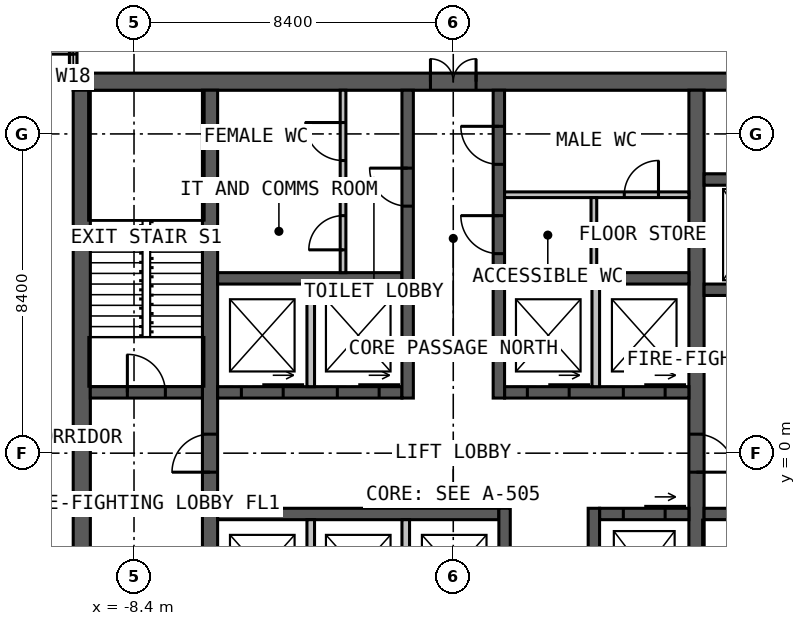
"""IFC4 building model, lengths in metres.
Left out: names, types, materials, properties, quantities, classifications, styles, units other than length and angle.
Written with IfcOpenShell. Run it as: python <this file> out.ifc"""

import sys

from ifc_helpers import new_model, si_unit, direction, frame, frame_2d, origin, place, context, subcontext, project, spatial, rectangle, extrude, element, fill, save


model = new_model("IFC4")
c1 = context("Model", 3, precision=1e-05, world=origin(), true_north=direction((0.0, 1.0)))
c2 = subcontext(c1, "Body", "Model", "MODEL_VIEW")
j1 = project(units=[si_unit("LENGTHUNIT", "METRE"), si_unit("PLANEANGLEUNIT", "RADIAN")], contexts=[c1])
p1 = place(None, origin())
s1 = spatial("IfcSite", under=j1, at=p1, CompositionType="ELEMENT")
p2 = place(p1, origin())
s2 = spatial("IfcBuilding", under=s1, at=p2, CompositionType="ELEMENT")
p3 = place(p2, frame((0.0, 0.0, 167.0)))
s3 = spatial("IfcBuildingStorey", under=s2, at=p3, CompositionType="ELEMENT", Elevation=167.0)
p4 = place(p3, frame((-10.0, 9.775, 0.0), z_axis=(0.0, 0.0, 1.0), x_axis=(1.0, 0.0, 0.0)))
e1 = element("IfcWall", 1, at=p4, inside=s3, PredefinedType="SOLIDWALL", context=c2, shape_type="SweptSolid", body=[
    extrude(rectangle(XDim=20.0, YDim=0.45, at=frame_2d((10.0, 0.0))), origin(), (0.0, 0.0, 1.0), 4.0),
])
p5 = place(p4, frame((9.4, 0.0, 0.0)))
e2 = element("IfcOpeningElement", 2, at=p5, cuts=e1, PredefinedType="OPENING", context=c2, shape_type="SweptSolid", body=[
    extrude(rectangle(XDim=1.2, YDim=2.2, at=frame_2d((0.6, 1.1))), frame((0.0, 0.235, 0.0), z_axis=(0.0, -1.0, 0.0), x_axis=(1.0, 0.0, 0.0)), (0.0, 0.0, 1.0), 0.47),
])
p6 = place(p3, frame((-9.775, 9.55, 0.0), z_axis=(0.0, 0.0, 1.0), x_axis=(0.0, -1.0, 0.0)))
e3 = element("IfcWall", 3, at=p6, inside=s3, PredefinedType="SOLIDWALL", context=c2, shape_type="SweptSolid", body=[
    extrude(rectangle(XDim=19.1, YDim=0.45, at=frame_2d((9.55, 0.0))), origin(), (0.0, 0.0, 1.0), 4.0),
])
p7 = place(p3, frame((-6.4, -9.55, 0.0), z_axis=(0.0, 0.0, 1.0), x_axis=(0.0, 1.0, 0.0)))
e4 = element("IfcWall", 4, at=p7, inside=s3, PredefinedType="SOLIDWALL", context=c2, shape_type="SweptSolid", body=[
    extrude(rectangle(XDim=19.1, YDim=0.4, at=frame_2d((9.55, 0.0))), origin(), (0.0, 0.0, 1.0), 4.0),
])
p8 = place(p7, frame((9.05, 0.0, 0.0)))
e5 = element("IfcOpeningElement", 5, at=p8, cuts=e4, PredefinedType="OPENING", context=c2, shape_type="SweptSolid", body=[
    extrude(rectangle(XDim=1.0, YDim=2.2, at=frame_2d((0.5, 1.1))), frame((0.0, 0.21, 0.0), z_axis=(0.0, -1.0, 0.0), x_axis=(1.0, 0.0, 0.0)), (0.0, 0.0, 1.0), 0.42),
])
p9 = place(p3, frame((6.4, 9.55, 0.0), z_axis=(0.0, 0.0, 1.0), x_axis=(0.0, -1.0, 0.0)))
e6 = element("IfcWall", 6, at=p9, inside=s3, PredefinedType="SOLIDWALL", context=c2, shape_type="SweptSolid", body=[
    extrude(rectangle(XDim=19.1, YDim=0.4, at=frame_2d((9.55, 0.0))), origin(), (0.0, 0.0, 1.0), 4.0),
])
p10 = place(p9, frame((9.05, 0.0, 0.0)))
e7 = element("IfcOpeningElement", 7, at=p10, cuts=e6, PredefinedType="OPENING", context=c2, shape_type="SweptSolid", body=[
    extrude(rectangle(XDim=1.0, YDim=2.2, at=frame_2d((0.5, 1.1))), frame((0.0, 0.21, 0.0), z_axis=(0.0, -1.0, 0.0), x_axis=(1.0, 0.0, 0.0)), (0.0, 0.0, 1.0), 0.42),
])
p11 = place(p3, frame((-6.2, 1.6, 0.0), z_axis=(0.0, 0.0, 1.0), x_axis=(1.0, 0.0, 0.0)))
e8 = element("IfcWall", 8, at=p11, inside=s3, PredefinedType="SOLIDWALL", context=c2, shape_type="SweptSolid", body=[
    extrude(rectangle(XDim=4.85, YDim=0.3, at=frame_2d((2.425, 0.0))), origin(), (0.0, 0.0, 1.0), 4.0),
])
p12 = place(p11, frame((0.625, 0.0, 0.0)))
e9 = element("IfcOpeningElement", 9, at=p12, cuts=e8, PredefinedType="OPENING", context=c2, shape_type="SweptSolid", body=[
    extrude(rectangle(XDim=1.1, YDim=2.2, at=frame_2d((0.55, 1.1))), frame((0.0, 0.16, 0.0), z_axis=(0.0, -1.0, 0.0), x_axis=(1.0, 0.0, 0.0)), (0.0, 0.0, 1.0), 0.32),
])
p13 = place(p11, frame((3.15, 0.0, 0.0)))
e10 = element("IfcOpeningElement", 10, at=p13, cuts=e8, PredefinedType="OPENING", context=c2, shape_type="SweptSolid", body=[
    extrude(rectangle(XDim=1.1, YDim=2.2, at=frame_2d((0.55, 1.1))), frame((0.0, 0.16, 0.0), z_axis=(0.0, -1.0, 0.0), x_axis=(1.0, 0.0, 0.0)), (0.0, 0.0, 1.0), 0.32),
])
p14 = place(p3, frame((1.35, 1.6, 0.0), z_axis=(0.0, 0.0, 1.0), x_axis=(1.0, 0.0, 0.0)))
e11 = element("IfcWall", 11, at=p14, inside=s3, PredefinedType="SOLIDWALL", context=c2, shape_type="SweptSolid", body=[
    extrude(rectangle(XDim=4.85, YDim=0.3, at=frame_2d((2.425, 0.0))), origin(), (0.0, 0.0, 1.0), 4.0),
])
p15 = place(p14, frame((0.6, 0.0, 0.0)))
e12 = element("IfcOpeningElement", 12, at=p15, cuts=e11, PredefinedType="OPENING", context=c2, shape_type="SweptSolid", body=[
    extrude(rectangle(XDim=1.1, YDim=2.2, at=frame_2d((0.55, 1.1))), frame((0.0, 0.16, 0.0), z_axis=(0.0, -1.0, 0.0), x_axis=(1.0, 0.0, 0.0)), (0.0, 0.0, 1.0), 0.32),
])
p16 = place(p14, frame((3.125, 0.0, 0.0)))
e13 = element("IfcOpeningElement", 13, at=p16, cuts=e11, PredefinedType="OPENING", context=c2, shape_type="SweptSolid", body=[
    extrude(rectangle(XDim=1.1, YDim=2.2, at=frame_2d((0.55, 1.1))), frame((0.0, 0.16, 0.0), z_axis=(0.0, -1.0, 0.0), x_axis=(1.0, 0.0, 0.0)), (0.0, 0.0, 1.0), 0.32),
])
for number, where, z_axis, x_axis in (
    (14, (-6.2, 4.6, 0.0), (0.0, 0.0, 1.0), (1.0, 0.0, 0.0)),
    (15, (1.35, 4.6, 0.0), (0.0, 0.0, 1.0), (1.0, 0.0, 0.0)),
):
    element("IfcWall", number, at=place(p3, frame(where, z_axis=z_axis, x_axis=x_axis)), inside=s3, PredefinedType="SOLIDWALL", context=c2, shape_type="SweptSolid", body=[
        extrude(rectangle(XDim=4.85, YDim=0.3, at=frame_2d((2.425, 0.0))), origin(), (0.0, 0.0, 1.0), 4.0),
    ])
p17 = place(p3, frame((-1.2, 1.45, 0.0), z_axis=(0.0, 0.0, 1.0), x_axis=(0.0, 1.0, 0.0)))
e16 = element("IfcWall", 16, at=p17, inside=s3, PredefinedType="SOLIDWALL", context=c2, shape_type="SweptSolid", body=[
    extrude(rectangle(XDim=8.1, YDim=0.3, at=frame_2d((4.05, 0.0))), origin(), (0.0, 0.0, 1.0), 4.0),
])
p18 = place(p17, frame((5.05, 0.0, 0.0)))
e17 = element("IfcOpeningElement", 17, at=p18, cuts=e16, PredefinedType="OPENING", context=c2, shape_type="SweptSolid", body=[
    extrude(rectangle(XDim=1.0, YDim=2.2, at=frame_2d((0.5, 1.1))), frame((0.0, 0.16, 0.0), z_axis=(0.0, -1.0, 0.0), x_axis=(1.0, 0.0, 0.0)), (0.0, 0.0, 1.0), 0.32),
])
p19 = place(p3, frame((1.2, 1.45, 0.0), z_axis=(0.0, 0.0, 1.0), x_axis=(0.0, 1.0, 0.0)))
e18 = element("IfcWall", 18, at=p19, inside=s3, PredefinedType="SOLIDWALL", context=c2, shape_type="SweptSolid", body=[
    extrude(rectangle(XDim=8.1, YDim=0.3, at=frame_2d((4.05, 0.0))), origin(), (0.0, 0.0, 1.0), 4.0),
])
p20 = place(p19, frame((3.8, 0.0, 0.0)))
e19 = element("IfcOpeningElement", 19, at=p20, cuts=e18, PredefinedType="OPENING", context=c2, shape_type="SweptSolid", body=[
    extrude(rectangle(XDim=1.0, YDim=2.2, at=frame_2d((0.5, 1.1))), frame((0.0, 0.16, 0.0), z_axis=(0.0, -1.0, 0.0), x_axis=(1.0, 0.0, 0.0)), (0.0, 0.0, 1.0), 0.32),
])
p21 = place(p19, frame((6.15, 0.0, 0.0)))
e20 = element("IfcOpeningElement", 20, at=p21, cuts=e18, PredefinedType="OPENING", context=c2, shape_type="SweptSolid", body=[
    extrude(rectangle(XDim=1.0, YDim=2.2, at=frame_2d((0.5, 1.1))), frame((0.0, 0.16, 0.0), z_axis=(0.0, -1.0, 0.0), x_axis=(1.0, 0.0, 0.0)), (0.0, 0.0, 1.0), 0.32),
])
p22 = place(p3, frame((-6.2, -1.6, 0.0), z_axis=(0.0, 0.0, 1.0), x_axis=(1.0, 0.0, 0.0)))
e21 = element("IfcWall", 21, at=p22, inside=s3, PredefinedType="SOLIDWALL", context=c2, shape_type="SweptSolid", body=[
    extrude(rectangle(XDim=7.4, YDim=0.3, at=frame_2d((3.7, 0.0))), origin(), (0.0, 0.0, 1.0), 4.0),
])
p23 = place(p3, frame((3.85, -1.6, 0.0), z_axis=(0.0, 0.0, 1.0), x_axis=(1.0, 0.0, 0.0)))
e22 = element("IfcWall", 22, at=p23, inside=s3, PredefinedType="SOLIDWALL", context=c2, shape_type="SweptSolid", body=[
    extrude(rectangle(XDim=2.35, YDim=0.3, at=frame_2d((1.175, 0.0))), origin(), (0.0, 0.0, 1.0), 4.0),
])
p24 = place(p23, frame((0.625, 0.0, 0.0)))
e23 = element("IfcOpeningElement", 23, at=p24, cuts=e22, PredefinedType="OPENING", context=c2, shape_type="SweptSolid", body=[
    extrude(rectangle(XDim=1.1, YDim=2.2, at=frame_2d((0.55, 1.1))), frame((0.0, 0.16, 0.0), z_axis=(0.0, -1.0, 0.0), x_axis=(1.0, 0.0, 0.0)), (0.0, 0.0, 1.0), 0.32),
])
p25 = place(p3, frame((1.35, -1.45, 0.0), z_axis=(0.0, 0.0, 1.0), x_axis=(0.0, -1.0, 0.0)))
e24 = element("IfcWall", 24, at=p25, inside=s3, PredefinedType="SOLIDWALL", context=c2, shape_type="SweptSolid", body=[
    extrude(rectangle(XDim=8.1, YDim=0.3, at=frame_2d((4.05, 0.0))), origin(), (0.0, 0.0, 1.0), 4.0),
])
p26 = place(p25, frame((5.975, 0.0, 0.0)))
e25 = element("IfcOpeningElement", 25, at=p26, cuts=e24, PredefinedType="OPENING", context=c2, shape_type="SweptSolid", body=[
    extrude(rectangle(XDim=1.0, YDim=2.2, at=frame_2d((0.5, 1.1))), frame((0.0, 0.16, 0.0), z_axis=(0.0, -1.0, 0.0), x_axis=(1.0, 0.0, 0.0)), (0.0, 0.0, 1.0), 0.32),
])
p27 = place(p25, frame((3.525, 0.0, 0.0)))
e26 = element("IfcOpeningElement", 26, at=p27, cuts=e24, PredefinedType="OPENING", context=c2, shape_type="SweptSolid", body=[
    extrude(rectangle(XDim=0.9, YDim=2.2, at=frame_2d((0.45, 1.1))), frame((0.0, 0.16, 0.0), z_axis=(0.0, -1.0, 0.0), x_axis=(1.0, 0.0, 0.0)), (0.0, 0.0, 1.0), 0.32),
])
p28 = place(p3, frame((3.7, -1.45, 0.0), z_axis=(0.0, 0.0, 1.0), x_axis=(0.0, -1.0, 0.0)))
e27 = element("IfcWall", 27, at=p28, inside=s3, PredefinedType="SOLIDWALL", context=c2, shape_type="SweptSolid", body=[
    extrude(rectangle(XDim=8.1, YDim=0.3, at=frame_2d((4.05, 0.0))), origin(), (0.0, 0.0, 1.0), 4.0),
])
p29 = place(p28, frame((5.1, 0.0, 0.0)))
e28 = element("IfcOpeningElement", 28, at=p29, cuts=e27, PredefinedType="OPENING", context=c2, shape_type="SweptSolid", body=[
    extrude(rectangle(XDim=0.9, YDim=2.2, at=frame_2d((0.45, 1.1))), frame((0.0, 0.16, 0.0), z_axis=(0.0, -1.0, 0.0), x_axis=(1.0, 0.0, 0.0)), (0.0, 0.0, 1.0), 0.32),
])
p30 = place(p3, frame((-9.55, 1.6, 0.0), z_axis=(0.0, 0.0, 1.0), x_axis=(1.0, 0.0, 0.0)))
e29 = element("IfcWall", 29, at=p30, inside=s3, PredefinedType="SOLIDWALL", context=c2, shape_type="SweptSolid", body=[
    extrude(rectangle(XDim=2.95, YDim=0.3, at=frame_2d((1.475, 0.0))), origin(), (0.0, 0.0, 1.0), 4.0),
])
p31 = place(p30, frame((0.975, 0.0, 0.0)))
e30 = element("IfcOpeningElement", 30, at=p31, cuts=e29, PredefinedType="OPENING", context=c2, shape_type="SweptSolid", body=[
    extrude(rectangle(XDim=1.0, YDim=2.2, at=frame_2d((0.5, 1.1))), frame((0.0, 0.16, 0.0), z_axis=(0.0, -1.0, 0.0), x_axis=(1.0, 0.0, 0.0)), (0.0, 0.0, 1.0), 0.32),
])
p32 = place(p3, frame((6.6, -1.6, 0.0), z_axis=(0.0, 0.0, 1.0), x_axis=(1.0, 0.0, 0.0)))
e31 = element("IfcWall", 31, at=p32, inside=s3, PredefinedType="SOLIDWALL", context=c2, shape_type="SweptSolid", body=[
    extrude(rectangle(XDim=2.95, YDim=0.3, at=frame_2d((1.475, 0.0))), origin(), (0.0, 0.0, 1.0), 4.0),
])
p33 = place(p32, frame((0.975, 0.0, 0.0)))
e32 = element("IfcOpeningElement", 32, at=p33, cuts=e31, PredefinedType="OPENING", context=c2, shape_type="SweptSolid", body=[
    extrude(rectangle(XDim=1.0, YDim=2.2, at=frame_2d((0.5, 1.1))), frame((0.0, 0.16, 0.0), z_axis=(0.0, -1.0, 0.0), x_axis=(1.0, 0.0, 0.0)), (0.0, 0.0, 1.0), 0.32),
])
p34 = place(p3, frame((6.6, 4.3, 0.0), z_axis=(0.0, 0.0, 1.0), x_axis=(1.0, 0.0, 0.0)))
e33 = element("IfcWall", 33, at=p34, inside=s3, PredefinedType="SOLIDWALL", context=c2, shape_type="SweptSolid", body=[
    extrude(rectangle(XDim=2.95, YDim=0.3, at=frame_2d((1.475, 0.0))), origin(), (0.0, 0.0, 1.0), 4.0),
])
p35 = place(p34, frame((0.75, 0.0, 0.0)))
e34 = element("IfcOpeningElement", 34, at=p35, cuts=e33, PredefinedType="OPENING", context=c2, shape_type="SweptSolid", body=[
    extrude(rectangle(XDim=1.1, YDim=2.2, at=frame_2d((0.55, 1.1))), frame((0.0, 0.16, 0.0), z_axis=(0.0, -1.0, 0.0), x_axis=(1.0, 0.0, 0.0)), (0.0, 0.0, 1.0), 0.32),
])
p36 = place(p3, frame((6.6, 7.2, 0.0), z_axis=(0.0, 0.0, 1.0), x_axis=(1.0, 0.0, 0.0)))
e35 = element("IfcWall", 35, at=p36, inside=s3, PredefinedType="SOLIDWALL", context=c2, shape_type="SweptSolid", body=[
    extrude(rectangle(XDim=2.95, YDim=0.3, at=frame_2d((1.475, 0.0))), origin(), (0.0, 0.0, 1.0), 4.0),
])
for number, where, z_axis, x_axis in (
    (36, (-3.75, 1.75, 0.0), (0.0, 0.0, 1.0), (0.0, 1.0, 0.0)),
    (37, (3.75, 1.75, 0.0), (0.0, 0.0, 1.0), (0.0, 1.0, 0.0)),
    (38, (-3.75, -1.75, 0.0), (0.0, 0.0, 1.0), (0.0, -1.0, 0.0)),
    (39, (-1.25, -1.75, 0.0), (0.0, 0.0, 1.0), (0.0, -1.0, 0.0)),
):
    element("IfcWall", number, at=place(p3, frame(where, z_axis=z_axis, x_axis=x_axis)), inside=s3, PredefinedType="SOLIDWALL", context=c2, shape_type="SweptSolid", body=[
        extrude(rectangle(XDim=2.7, YDim=0.2, at=frame_2d((1.35, 0.0))), origin(), (0.0, 0.0, 1.0), 3.75),
    ])
p37 = place(p3, frame((1.35, 6.8, 0.0), z_axis=(0.0, 0.0, 1.0), x_axis=(1.0, 0.0, 0.0)))
e40 = element("IfcWall", 40, at=p37, inside=s3, PredefinedType="PARTITIONING", context=c2, shape_type="SweptSolid", body=[
    extrude(rectangle(XDim=4.85, YDim=0.15, at=frame_2d((2.425, 0.0))), origin(), (0.0, 0.0, 1.0), 3.75),
])
p38 = place(p37, frame((3.15, 0.0, 0.0)))
e41 = element("IfcOpeningElement", 41, at=p38, cuts=e40, PredefinedType="OPENING", context=c2, shape_type="SweptSolid", body=[
    extrude(rectangle(XDim=0.9, YDim=2.2, at=frame_2d((0.45, 1.1))), frame((0.0, 0.085, 0.0), z_axis=(0.0, -1.0, 0.0), x_axis=(1.0, 0.0, 0.0)), (0.0, 0.0, 1.0), 0.17),
])
p39 = place(p3, frame((3.7, 4.75, 0.0), z_axis=(0.0, 0.0, 1.0), x_axis=(0.0, 1.0, 0.0)))
e42 = element("IfcWall", 42, at=p39, inside=s3, PredefinedType="PARTITIONING", context=c2, shape_type="SweptSolid", body=[
    extrude(rectangle(XDim=1.975, YDim=0.15, at=frame_2d((0.988, 0.0))), origin(), (0.0, 0.0, 1.0), 3.75),
])
p40 = place(p3, frame((-2.9, 4.75, 0.0), z_axis=(0.0, 0.0, 1.0), x_axis=(0.0, 1.0, 0.0)))
e43 = element("IfcWall", 43, at=p40, inside=s3, PredefinedType="PARTITIONING", context=c2, shape_type="SweptSolid", body=[
    extrude(rectangle(XDim=4.8, YDim=0.15, at=frame_2d((2.4, 0.0))), origin(), (0.0, 0.0, 1.0), 3.75),
])
p41 = place(p40, frame((2.95, 0.0, 0.0)))
e44 = element("IfcOpeningElement", 44, at=p41, cuts=e43, PredefinedType="OPENING", context=c2, shape_type="SweptSolid", body=[
    extrude(rectangle(XDim=1.0, YDim=2.2, at=frame_2d((0.5, 1.1))), frame((0.0, 0.085, 0.0), z_axis=(0.0, -1.0, 0.0), x_axis=(1.0, 0.0, 0.0)), (0.0, 0.0, 1.0), 0.17),
])
p42 = place(p40, frame((0.6, 0.0, 0.0)))
e45 = element("IfcOpeningElement", 45, at=p42, cuts=e43, PredefinedType="OPENING", context=c2, shape_type="SweptSolid", body=[
    extrude(rectangle(XDim=0.9, YDim=2.2, at=frame_2d((0.45, 1.1))), frame((0.0, 0.085, 0.0), z_axis=(0.0, -1.0, 0.0), x_axis=(1.0, 0.0, 0.0)), (0.0, 0.0, 1.0), 0.17),
])
p43 = place(p3, frame((-6.2, 7.0, 0.0), z_axis=(0.0, 0.0, 1.0), x_axis=(1.0, 0.0, 0.0)))
e46 = element("IfcWall", 46, at=p43, inside=s3, PredefinedType="PARTITIONING", context=c2, shape_type="SweptSolid", body=[
    extrude(rectangle(XDim=3.225, YDim=0.15, at=frame_2d((1.612, 0.0))), origin(), (0.0, 0.0, 1.0), 3.75),
])
p44 = place(p3, frame((-10.0, 10.0, 0.0), z_axis=(0.0, 0.0, 1.0), x_axis=(0.0, 1.0, 0.0)))
e47 = element("IfcWall", 47, at=p44, inside=s3, PredefinedType="PARTITIONING", context=c2, shape_type="SweptSolid", body=[
    extrude(rectangle(XDim=2.0, YDim=0.2, at=frame_2d((1.0, 0.0))), origin(), (0.0, 0.0, 1.0), 3.8),
])
p45 = place(p44, frame((0.5, 0.0, 0.0)))
e48 = element("IfcOpeningElement", 48, at=p45, cuts=e47, PredefinedType="OPENING", context=c2, shape_type="SweptSolid", body=[
    extrude(rectangle(XDim=1.0, YDim=2.2, at=frame_2d((0.5, 1.1))), frame((0.0, 0.11, 0.0), z_axis=(0.0, -1.0, 0.0), x_axis=(1.0, 0.0, 0.0)), (0.0, 0.0, 1.0), 0.22),
])
p46 = place(p5, origin())
e49 = element("IfcDoor", 49, at=p46, inside=s3, OperationType="DOUBLE_DOOR_SINGLE_SWING", PredefinedType="DOOR", context=c2, shape_type="SweptSolid", body=[
    extrude(rectangle(XDim=1.2, YDim=2.2, at=frame_2d((0.6, 1.1))), frame((0.0, 0.025, 0.0), z_axis=(0.0, -1.0, 0.0), x_axis=(1.0, 0.0, 0.0)), (0.0, 0.0, 1.0), 0.05),
])
fill(e2, e49)
p47 = place(p8, origin())
e50 = element("IfcDoor", 50, at=p47, inside=s3, OperationType="SINGLE_SWING_LEFT", PredefinedType="DOOR", context=c2, shape_type="SweptSolid", body=[
    extrude(rectangle(XDim=1.0, YDim=2.2, at=frame_2d((0.5, 1.1))), frame((0.0, 0.025, 0.0), z_axis=(0.0, -1.0, 0.0), x_axis=(1.0, 0.0, 0.0)), (0.0, 0.0, 1.0), 0.05),
])
fill(e5, e50)
p48 = place(p10, origin())
e51 = element("IfcDoor", 51, at=p48, inside=s3, OperationType="SINGLE_SWING_RIGHT", PredefinedType="DOOR", context=c2, shape_type="SweptSolid", body=[
    extrude(rectangle(XDim=1.0, YDim=2.2, at=frame_2d((0.5, 1.1))), frame((0.0, 0.025, 0.0), z_axis=(0.0, -1.0, 0.0), x_axis=(1.0, 0.0, 0.0)), (0.0, 0.0, 1.0), 0.05),
])
fill(e7, e51)
p49 = place(p31, origin())
e52 = element("IfcDoor", 52, at=p49, inside=s3, OperationType="SINGLE_SWING_LEFT", PredefinedType="DOOR", context=c2, shape_type="SweptSolid", body=[
    extrude(rectangle(XDim=1.0, YDim=2.2, at=frame_2d((0.5, 1.1))), frame((0.0, 0.025, 0.0), z_axis=(0.0, -1.0, 0.0), x_axis=(1.0, 0.0, 0.0)), (0.0, 0.0, 1.0), 0.05),
])
fill(e30, e52)
p50 = place(p18, origin())
e53 = element("IfcDoor", 53, at=p50, inside=s3, OperationType="SINGLE_SWING_RIGHT", PredefinedType="DOOR", context=c2, shape_type="SweptSolid", body=[
    extrude(rectangle(XDim=1.0, YDim=2.2, at=frame_2d((0.5, 1.1))), frame((0.0, 0.025, 0.0), z_axis=(0.0, -1.0, 0.0), x_axis=(1.0, 0.0, 0.0)), (0.0, 0.0, 1.0), 0.05),
])
fill(e17, e53)
p51 = place(p20, origin())
e54 = element("IfcDoor", 54, at=p51, inside=s3, OperationType="SINGLE_SWING_RIGHT", PredefinedType="DOOR", context=c2, shape_type="SweptSolid", body=[
    extrude(rectangle(XDim=1.0, YDim=2.2, at=frame_2d((0.5, 1.1))), frame((0.0, 0.025, 0.0), z_axis=(0.0, -1.0, 0.0), x_axis=(1.0, 0.0, 0.0)), (0.0, 0.0, 1.0), 0.05),
])
fill(e19, e54)
p52 = place(p21, origin())
e55 = element("IfcDoor", 55, at=p52, inside=s3, OperationType="SINGLE_SWING_RIGHT", PredefinedType="DOOR", context=c2, shape_type="SweptSolid", body=[
    extrude(rectangle(XDim=1.0, YDim=2.2, at=frame_2d((0.5, 1.1))), frame((0.0, 0.025, 0.0), z_axis=(0.0, -1.0, 0.0), x_axis=(1.0, 0.0, 0.0)), (0.0, 0.0, 1.0), 0.05),
])
fill(e20, e55)
p53 = place(p38, origin())
e56 = element("IfcDoor", 56, at=p53, inside=s3, OperationType="SINGLE_SWING_RIGHT", PredefinedType="DOOR", context=c2, shape_type="SweptSolid", body=[
    extrude(rectangle(XDim=0.9, YDim=2.2, at=frame_2d((0.45, 1.1))), frame((0.0, 0.025, 0.0), z_axis=(0.0, -1.0, 0.0), x_axis=(1.0, 0.0, 0.0)), (0.0, 0.0, 1.0), 0.05),
])
fill(e41, e56)
p54 = place(p41, origin())
e57 = element("IfcDoor", 57, at=p54, inside=s3, OperationType="SINGLE_SWING_RIGHT", PredefinedType="DOOR", context=c2, shape_type="SweptSolid", body=[
    extrude(rectangle(XDim=1.0, YDim=2.2, at=frame_2d((0.5, 1.1))), frame((0.0, 0.025, 0.0), z_axis=(0.0, -1.0, 0.0), x_axis=(1.0, 0.0, 0.0)), (0.0, 0.0, 1.0), 0.05),
])
fill(e44, e57)
p55 = place(p42, origin())
e58 = element("IfcDoor", 58, at=p55, inside=s3, OperationType="SINGLE_SWING_LEFT", PredefinedType="DOOR", context=c2, shape_type="SweptSolid", body=[
    extrude(rectangle(XDim=0.9, YDim=2.2, at=frame_2d((0.45, 1.1))), frame((0.0, 0.025, 0.0), z_axis=(0.0, -1.0, 0.0), x_axis=(1.0, 0.0, 0.0)), (0.0, 0.0, 1.0), 0.05),
])
fill(e45, e58)
p56 = place(p12, origin())
e59 = element("IfcDoor", 59, at=p56, inside=s3, OperationType="SLIDING_TO_LEFT", PredefinedType="DOOR", context=c2, shape_type="SweptSolid", body=[
    extrude(rectangle(XDim=1.1, YDim=2.2, at=frame_2d((0.55, 1.1))), frame((0.0, 0.025, 0.0), z_axis=(0.0, -1.0, 0.0), x_axis=(1.0, 0.0, 0.0)), (0.0, 0.0, 1.0), 0.05),
])
fill(e9, e59)
p57 = place(p13, origin())
e60 = element("IfcDoor", 60, at=p57, inside=s3, OperationType="SLIDING_TO_LEFT", PredefinedType="DOOR", context=c2, shape_type="SweptSolid", body=[
    extrude(rectangle(XDim=1.1, YDim=2.2, at=frame_2d((0.55, 1.1))), frame((0.0, 0.025, 0.0), z_axis=(0.0, -1.0, 0.0), x_axis=(1.0, 0.0, 0.0)), (0.0, 0.0, 1.0), 0.05),
])
fill(e10, e60)
p58 = place(p15, origin())
e61 = element("IfcDoor", 61, at=p58, inside=s3, OperationType="SLIDING_TO_LEFT", PredefinedType="DOOR", context=c2, shape_type="SweptSolid", body=[
    extrude(rectangle(XDim=1.1, YDim=2.2, at=frame_2d((0.55, 1.1))), frame((0.0, 0.025, 0.0), z_axis=(0.0, -1.0, 0.0), x_axis=(1.0, 0.0, 0.0)), (0.0, 0.0, 1.0), 0.05),
])
fill(e12, e61)
p59 = place(p16, origin())
e62 = element("IfcDoor", 62, at=p59, inside=s3, OperationType="SLIDING_TO_LEFT", PredefinedType="DOOR", context=c2, shape_type="SweptSolid", body=[
    extrude(rectangle(XDim=1.1, YDim=2.2, at=frame_2d((0.55, 1.1))), frame((0.0, 0.025, 0.0), z_axis=(0.0, -1.0, 0.0), x_axis=(1.0, 0.0, 0.0)), (0.0, 0.0, 1.0), 0.05),
])
fill(e13, e62)
p60 = place(p24, origin())
e63 = element("IfcDoor", 63, at=p60, inside=s3, OperationType="SLIDING_TO_LEFT", PredefinedType="DOOR", context=c2, shape_type="SweptSolid", body=[
    extrude(rectangle(XDim=1.1, YDim=2.2, at=frame_2d((0.55, 1.1))), frame((0.0, 0.025, 0.0), z_axis=(0.0, -1.0, 0.0), x_axis=(1.0, 0.0, 0.0)), (0.0, 0.0, 1.0), 0.05),
])
fill(e23, e63)
p61 = place(p45, origin())
e64 = element("IfcDoor", 64, at=p61, inside=s3, OperationType="SINGLE_SWING_LEFT", PredefinedType="DOOR", context=c2, shape_type="SweptSolid", body=[
    extrude(rectangle(XDim=1.0, YDim=2.2, at=frame_2d((0.5, 1.1))), frame((0.0, 0.025, 0.0), z_axis=(0.0, -1.0, 0.0), x_axis=(1.0, 0.0, 0.0)), (0.0, 0.0, 1.0), 0.05),
])
fill(e48, e64)
save(model, sys.argv[1])
